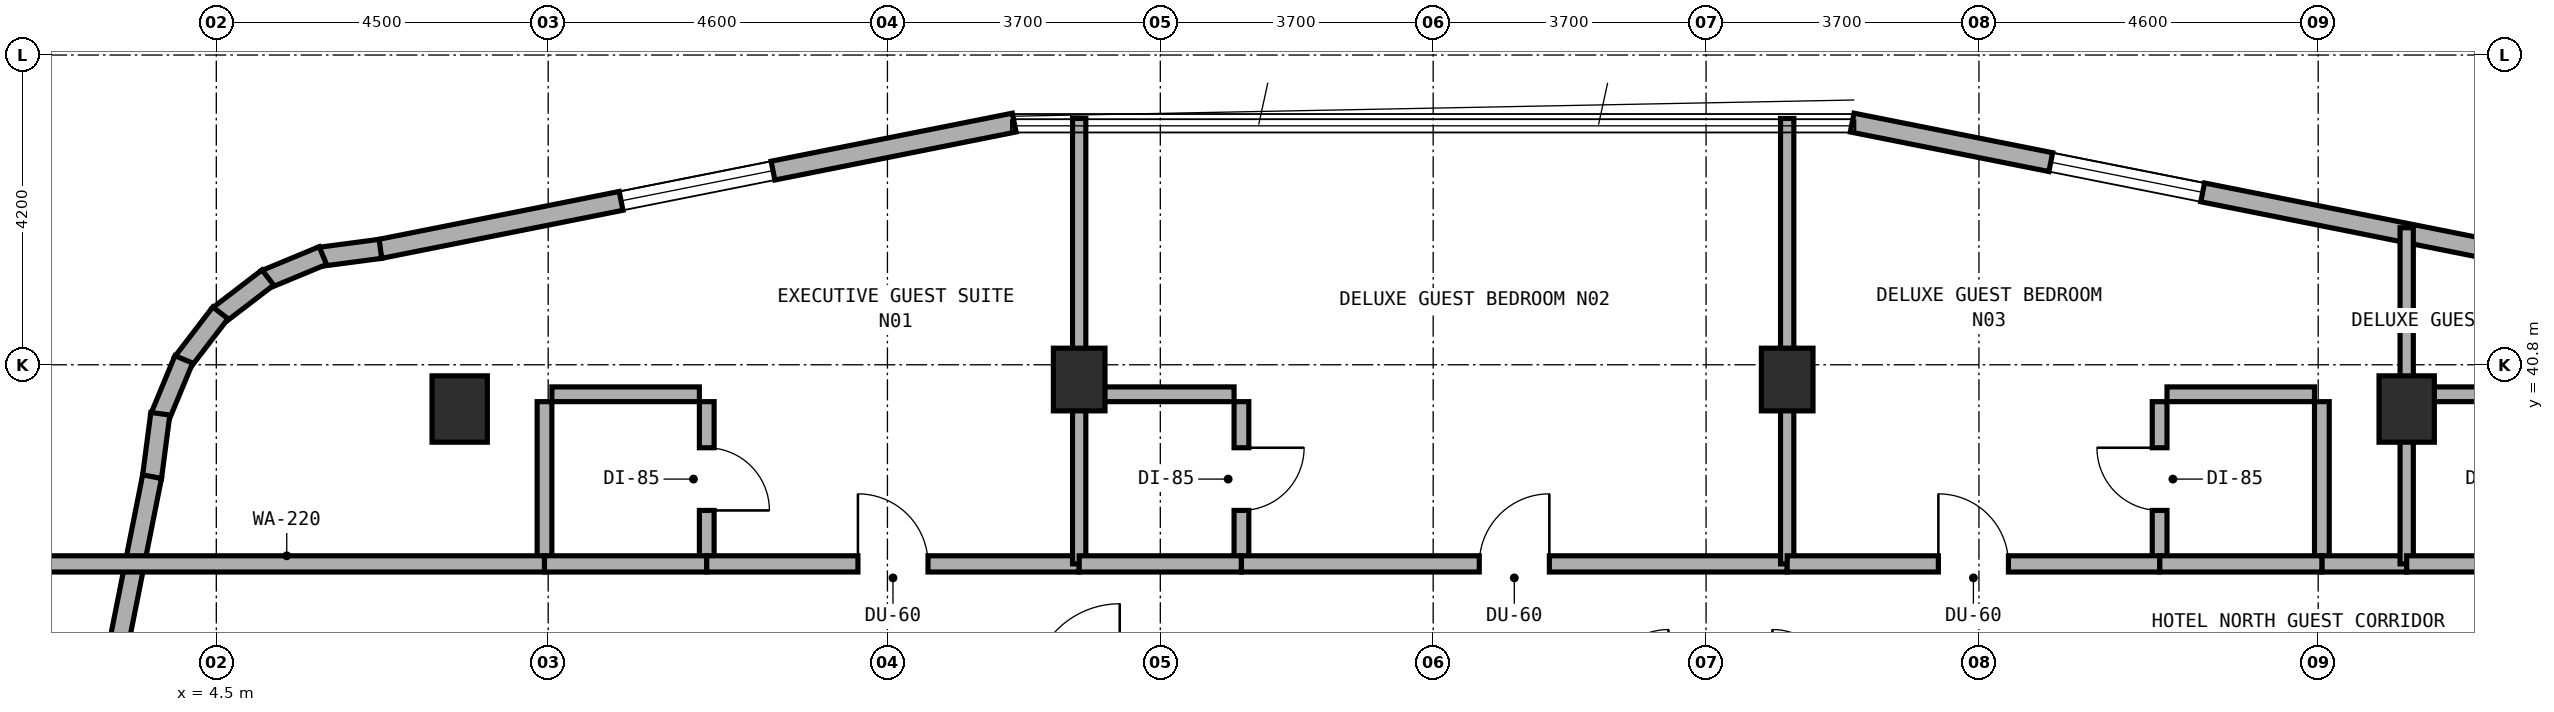
"""IFC4 building model, lengths in metres.
Left out: names, types, materials, properties, quantities, classifications, styles, units other than length and angle.
Written with IfcOpenShell. Run it as: python <this file> out.ifc"""

import sys

from ifc_helpers import new_model, si_unit, direction, frame, frame_2d, origin, origin_2d, place, context, subcontext, project, spatial, rectangle, extrude, element, fill, save


model = new_model("IFC4")
c1 = context("Model", 3, precision=1e-05, world=origin(), true_north=direction((0.0, 1.0)))
c2 = subcontext(c1, "Body", "Model", "MODEL_VIEW")
j1 = project(units=[si_unit("LENGTHUNIT", "METRE"), si_unit("PLANEANGLEUNIT", "RADIAN")], contexts=[c1])
p1 = place(None, origin())
s1 = spatial("IfcSite", under=j1, at=p1, CompositionType="ELEMENT")
p2 = place(p1, origin())
s2 = spatial("IfcBuilding", under=s1, at=p2, CompositionType="ELEMENT")
p3 = place(p2, frame((0.0, 0.0, 224.3)))
s3 = spatial("IfcBuildingStorey", under=s2, at=p3, CompositionType="ELEMENT", Elevation=224.3)
for number, where, z_axis, x_axis in (
    (1, (16.2, 40.6, 0.0), (0.0, 0.0, 1.0), (1.0, 0.0, 0.0)),
    (2, (25.8, 40.6, 0.0), (0.0, 0.0, 1.0), (1.0, 0.0, 0.0)),
):
    element("IfcColumn", number, at=place(p3, frame(where, z_axis=z_axis, x_axis=x_axis)), inside=s3, PredefinedType="COLUMN", context=c2, shape_type="SweptSolid", body=[
        extrude(rectangle(XDim=0.7, YDim=0.85, at=origin_2d()), origin(), (0.0, 0.0, 1.0), 3.6),
    ])
for number, where, z_axis, x_axis in (
    (3, (34.2, 40.2, 0.0), (0.0, 0.0, 1.0), (1.0, 0.0, 0.0)),
    (4, (7.8, 40.2, 0.0), (0.0, 0.0, 1.0), (1.0, 0.0, 0.0)),
):
    element("IfcColumn", number, at=place(p3, frame(where, z_axis=z_axis, x_axis=x_axis)), inside=s3, PredefinedType="COLUMN", context=c2, shape_type="SweptSolid", body=[
        extrude(rectangle(XDim=0.75, YDim=0.9, at=origin_2d()), origin(), (0.0, 0.0, 1.0), 3.6),
    ])
p4 = place(p3, frame((35.283, 42.371, 0.0), z_axis=(0.0, 0.0, 1.0), x_axis=(-0.980745199176, 0.195291715883, 0.0)))
e5 = element("IfcWall", 5, at=p4, inside=s3, PredefinedType="STANDARD", context=c2, shape_type="SweptSolid", body=[
    extrude(rectangle(XDim=8.771, YDim=0.26, at=frame_2d((4.385, 0.0))), origin(), (0.0, 0.0, 1.0), 3.32),
])
p5 = place(p4, frame((3.925, 0.0, 0.85)))
e6 = element("IfcOpeningElement", 6, at=p5, cuts=e5, PredefinedType="OPENING", context=c2, shape_type="SweptSolid", body=[
    extrude(rectangle(XDim=2.1, YDim=1.5, at=frame_2d((1.05, 0.75))), frame((0.0, 0.14, 0.0), z_axis=(0.0, -1.0, 0.0), x_axis=(1.0, 0.0, 0.0)), (0.0, 0.0, 1.0), 0.28),
])
p6 = place(p3, frame((15.319, 44.084, 0.0), z_axis=(0.0, 0.0, 1.0), x_axis=(-0.980745199176, -0.195291715883, 0.0)))
e7 = element("IfcWall", 7, at=p6, inside=s3, PredefinedType="STANDARD", context=c2, shape_type="SweptSolid", body=[
    extrude(rectangle(XDim=8.771, YDim=0.26, at=frame_2d((4.385, 0.0))), origin(), (0.0, 0.0, 1.0), 3.32),
])
p7 = place(p6, frame((3.335, 0.0, 0.85)))
e8 = element("IfcOpeningElement", 8, at=p7, cuts=e7, PredefinedType="OPENING", context=c2, shape_type="SweptSolid", body=[
    extrude(rectangle(XDim=2.1, YDim=1.5, at=frame_2d((1.05, 0.75))), frame((0.0, 0.14, 0.0), z_axis=(0.0, -1.0, 0.0), x_axis=(1.0, 0.0, 0.0)), (0.0, 0.0, 1.0), 0.28),
])
p8 = place(p3, frame((6.725, 42.372, 0.0), z_axis=(0.0, 0.0, 1.0), x_axis=(-0.9913883573, -0.130954667764, 0.0)))
e9 = element("IfcWall", 9, at=p8, inside=s3, PredefinedType="STANDARD", context=c2, shape_type="SweptSolid", body=[
    extrude(rectangle(XDim=0.833, YDim=0.26, at=frame_2d((0.417, 0.0))), origin(), (0.0, 0.0, 1.0), 3.32),
])
p9 = place(p3, frame((5.945, 42.281, 0.0), z_axis=(0.0, 0.0, 1.0), x_axis=(-0.923754491172, -0.382985169477, 0.0)))
e10 = element("IfcWall", 10, at=p9, inside=s3, PredefinedType="STANDARD", context=c2, shape_type="SweptSolid", body=[
    extrude(rectangle(XDim=0.851, YDim=0.26, at=frame_2d((0.426, 0.0))), origin(), (0.0, 0.0, 1.0), 3.32),
])
for number, where, z_axis, x_axis in (
    (11, (5.199, 41.983, 0.0), (0.0, 0.0, 1.0), (-0.794, -0.608, 0.0)),
    (12, (4.555, 41.504, 0.0), (0.0, 0.0, 1.0), (-0.608, -0.794, 0.0)),
):
    element("IfcWall", number, at=place(p3, frame(where, z_axis=z_axis, x_axis=x_axis)), inside=s3, PredefinedType="STANDARD", context=c2, shape_type="SweptSolid", body=[
        extrude(rectangle(XDim=0.85, YDim=0.26, at=frame_2d((0.425, 0.0))), origin(), (0.0, 0.0, 1.0), 3.32),
    ])
p10 = place(p3, frame((4.059, 40.873, 0.0), z_axis=(0.0, 0.0, 1.0), x_axis=(-0.383229930484, -0.923652976167, 0.0)))
e13 = element("IfcWall", 13, at=p10, inside=s3, PredefinedType="STANDARD", context=c2, shape_type="SweptSolid", body=[
    extrude(rectangle(XDim=0.851, YDim=0.26, at=frame_2d((0.426, 0.0))), origin(), (0.0, 0.0, 1.0), 3.32),
])
p11 = place(p3, frame((3.741, 40.136, 0.0), z_axis=(0.0, 0.0, 1.0), x_axis=(-0.130156359936, -0.991493480548, 0.0)))
e14 = element("IfcWall", 14, at=p11, inside=s3, PredefinedType="STANDARD", context=c2, shape_type="SweptSolid", body=[
    extrude(rectangle(XDim=0.868, YDim=0.26, at=frame_2d((0.434, 0.0))), origin(), (0.0, 0.0, 1.0), 3.32),
])
p12 = place(p3, frame((3.629, 39.283, 0.0), z_axis=(0.0, 0.0, 1.0), x_axis=(-0.195291715883, -0.980745199176, 0.0)))
e15 = element("IfcWall", 15, at=p12, inside=s3, PredefinedType="STANDARD", context=c2, shape_type="SweptSolid", body=[
    extrude(rectangle(XDim=8.771, YDim=0.26, at=frame_2d((4.385, 0.0))), origin(), (0.0, 0.0, 1.0), 3.32),
])
p13 = place(p12, frame((4.0, 0.0, 0.85)))
e16 = element("IfcOpeningElement", 16, at=p13, cuts=e15, PredefinedType="OPENING", context=c2, shape_type="SweptSolid", body=[
    extrude(rectangle(XDim=2.1, YDim=1.5, at=frame_2d((1.05, 0.75))), frame((0.0, 0.14, 0.0), z_axis=(0.0, -1.0, 0.0), x_axis=(1.0, 0.0, 0.0)), (0.0, 0.0, 1.0), 0.28),
])
p14 = place(p3, frame((11.15, 38.2, 0.0), z_axis=(0.0, 0.0, 1.0), x_axis=(0.0, 1.0, 0.0)))
e17 = element("IfcWall", 17, at=p14, inside=s3, PredefinedType="PLUMBINGWALL", context=c2, shape_type="SweptSolid", body=[
    extrude(rectangle(XDim=2.1, YDim=0.2, at=frame_2d((1.05, 0.0))), origin(), (0.0, 0.0, 1.0), 3.015),
])
p15 = place(p14, frame((0.625, 0.0, 0.0)))
e18 = element("IfcOpeningElement", 18, at=p15, cuts=e17, PredefinedType="OPENING", context=c2, shape_type="SweptSolid", body=[
    extrude(rectangle(XDim=0.85, YDim=2.1, at=frame_2d((0.425, 1.05))), frame((0.0, 0.11, 0.0), z_axis=(0.0, -1.0, 0.0), x_axis=(1.0, 0.0, 0.0)), (0.0, 0.0, 1.0), 0.22),
])
p16 = place(p3, frame((9.05, 40.4, 0.0), z_axis=(0.0, 0.0, 1.0), x_axis=(1.0, 0.0, 0.0)))
e19 = element("IfcWall", 19, at=p16, inside=s3, PredefinedType="PLUMBINGWALL", context=c2, shape_type="SweptSolid", body=[
    extrude(rectangle(XDim=2.0, YDim=0.2, at=frame_2d((1.0, 0.0))), origin(), (0.0, 0.0, 1.0), 3.015),
])
p17 = place(p3, frame((8.95, 38.2, 0.0), z_axis=(0.0, 0.0, 1.0), x_axis=(0.0, 1.0, 0.0)))
e20 = element("IfcWall", 20, at=p17, inside=s3, PredefinedType="PLUMBINGWALL", context=c2, shape_type="SweptSolid", body=[
    extrude(rectangle(XDim=2.1, YDim=0.2, at=frame_2d((1.05, 0.0))), origin(), (0.0, 0.0, 1.0), 3.015),
])
p18 = place(p3, frame((1.96, 38.1, 0.0), z_axis=(0.0, 0.0, 1.0), x_axis=(1.0, 0.0, 0.0)))
e21 = element("IfcWall", 21, at=p18, inside=s3, PredefinedType="SOLIDWALL", context=c2, shape_type="SweptSolid", body=[
    extrude(rectangle(XDim=6.99, YDim=0.22, at=frame_2d((3.495, 0.0))), origin(), (0.0, 0.0, 1.0), 2.695),
])
p19 = place(p3, frame((8.95, 38.1, 0.0), z_axis=(0.0, 0.0, 1.0), x_axis=(1.0, 0.0, 0.0)))
e22 = element("IfcWall", 22, at=p19, inside=s3, PredefinedType="SOLIDWALL", context=c2, shape_type="SweptSolid", body=[
    extrude(rectangle(XDim=2.2, YDim=0.22, at=frame_2d((1.1, 0.0))), origin(), (0.0, 0.0, 1.0), 3.32),
])
p20 = place(p3, frame((11.15, 38.1, 0.0), z_axis=(0.0, 0.0, 1.0), x_axis=(1.0, 0.0, 0.0)))
e23 = element("IfcWall", 23, at=p20, inside=s3, PredefinedType="SOLIDWALL", context=c2, shape_type="SweptSolid", body=[
    extrude(rectangle(XDim=5.05, YDim=0.22, at=frame_2d((2.525, 0.0))), origin(), (0.0, 0.0, 1.0), 2.695),
])
p21 = place(p20, frame((2.05, 0.0, 0.0)))
e24 = element("IfcOpeningElement", 24, at=p21, cuts=e23, PredefinedType="OPENING", context=c2, shape_type="SweptSolid", body=[
    extrude(rectangle(XDim=0.95, YDim=2.1, at=frame_2d((0.475, 1.05))), frame((0.0, 0.12, 0.0), z_axis=(0.0, -1.0, 0.0), x_axis=(1.0, 0.0, 0.0)), (0.0, 0.0, 1.0), 0.24),
])
p22 = place(p3, frame((16.2, 38.1, 0.0), z_axis=(0.0, 0.0, 1.0), x_axis=(0.0, 1.0, 0.0)))
e25 = element("IfcWall", 25, at=p22, inside=s3, PredefinedType="SOLIDWALL", context=c2, shape_type="SweptSolid", body=[
    extrude(rectangle(XDim=6.04, YDim=0.18, at=frame_2d((3.02, 0.0))), origin(), (0.0, 0.0, 1.0), 2.695),
])
p23 = place(p3, frame((18.4, 38.2, 0.0), z_axis=(0.0, 0.0, 1.0), x_axis=(0.0, 1.0, 0.0)))
e26 = element("IfcWall", 26, at=p23, inside=s3, PredefinedType="PLUMBINGWALL", context=c2, shape_type="SweptSolid", body=[
    extrude(rectangle(XDim=2.1, YDim=0.2, at=frame_2d((1.05, 0.0))), origin(), (0.0, 0.0, 1.0), 3.055),
])
p24 = place(p23, frame((0.625, 0.0, 0.0)))
e27 = element("IfcOpeningElement", 27, at=p24, cuts=e26, PredefinedType="OPENING", context=c2, shape_type="SweptSolid", body=[
    extrude(rectangle(XDim=0.85, YDim=2.1, at=frame_2d((0.425, 1.05))), frame((0.0, 0.11, 0.0), z_axis=(0.0, -1.0, 0.0), x_axis=(1.0, 0.0, 0.0)), (0.0, 0.0, 1.0), 0.22),
])
p25 = place(p3, frame((16.3, 40.4, 0.0), z_axis=(0.0, 0.0, 1.0), x_axis=(1.0, 0.0, 0.0)))
e28 = element("IfcWall", 28, at=p25, inside=s3, PredefinedType="PLUMBINGWALL", context=c2, shape_type="SweptSolid", body=[
    extrude(rectangle(XDim=2.0, YDim=0.2, at=frame_2d((1.0, 0.0))), origin(), (0.0, 0.0, 1.0), 3.015),
])
p26 = place(p3, frame((16.2, 38.1, 0.0), z_axis=(0.0, 0.0, 1.0), x_axis=(1.0, 0.0, 0.0)))
e29 = element("IfcWall", 29, at=p26, inside=s3, PredefinedType="SOLIDWALL", context=c2, shape_type="SweptSolid", body=[
    extrude(rectangle(XDim=2.2, YDim=0.22, at=frame_2d((1.1, 0.0))), origin(), (0.0, 0.0, 1.0), 2.695),
])
p27 = place(p3, frame((18.4, 38.1, 0.0), z_axis=(0.0, 0.0, 1.0), x_axis=(1.0, 0.0, 0.0)))
e30 = element("IfcWall", 30, at=p27, inside=s3, PredefinedType="SOLIDWALL", context=c2, shape_type="SweptSolid", body=[
    extrude(rectangle(XDim=7.4, YDim=0.22, at=frame_2d((3.7, 0.0))), origin(), (0.0, 0.0, 1.0), 2.695),
])
p28 = place(p27, frame((3.225, 0.0, 0.0)))
e31 = element("IfcOpeningElement", 31, at=p28, cuts=e30, PredefinedType="OPENING", context=c2, shape_type="SweptSolid", body=[
    extrude(rectangle(XDim=0.95, YDim=2.1, at=frame_2d((0.475, 1.05))), frame((0.0, 0.12, 0.0), z_axis=(0.0, -1.0, 0.0), x_axis=(1.0, 0.0, 0.0)), (0.0, 0.0, 1.0), 0.24),
])
p29 = place(p3, frame((25.8, 38.1, 0.0), z_axis=(0.0, 0.0, 1.0), x_axis=(0.0, 1.0, 0.0)))
e32 = element("IfcWall", 32, at=p29, inside=s3, PredefinedType="SOLIDWALL", context=c2, shape_type="SweptSolid", body=[
    extrude(rectangle(XDim=6.04, YDim=0.18, at=frame_2d((3.02, 0.0))), origin(), (0.0, 0.0, 1.0), 2.695),
])
p30 = place(p3, frame((30.85, 38.2, 0.0), z_axis=(0.0, 0.0, 1.0), x_axis=(0.0, 1.0, 0.0)))
e33 = element("IfcWall", 33, at=p30, inside=s3, PredefinedType="PLUMBINGWALL", context=c2, shape_type="SweptSolid", body=[
    extrude(rectangle(XDim=2.1, YDim=0.2, at=frame_2d((1.05, 0.0))), origin(), (0.0, 0.0, 1.0), 3.015),
])
p31 = place(p30, frame((0.625, 0.0, 0.0)))
e34 = element("IfcOpeningElement", 34, at=p31, cuts=e33, PredefinedType="OPENING", context=c2, shape_type="SweptSolid", body=[
    extrude(rectangle(XDim=0.85, YDim=2.1, at=frame_2d((0.425, 1.05))), frame((0.0, 0.11, 0.0), z_axis=(0.0, -1.0, 0.0), x_axis=(1.0, 0.0, 0.0)), (0.0, 0.0, 1.0), 0.22),
])
p32 = place(p3, frame((30.95, 40.4, 0.0), z_axis=(0.0, 0.0, 1.0), x_axis=(1.0, 0.0, 0.0)))
e35 = element("IfcWall", 35, at=p32, inside=s3, PredefinedType="PLUMBINGWALL", context=c2, shape_type="SweptSolid", body=[
    extrude(rectangle(XDim=2.0, YDim=0.2, at=frame_2d((1.0, 0.0))), origin(), (0.0, 0.0, 1.0), 3.015),
])
p33 = place(p3, frame((33.05, 38.2, 0.0), z_axis=(0.0, 0.0, 1.0), x_axis=(0.0, 1.0, 0.0)))
e36 = element("IfcWall", 36, at=p33, inside=s3, PredefinedType="PLUMBINGWALL", context=c2, shape_type="SweptSolid", body=[
    extrude(rectangle(XDim=2.1, YDim=0.2, at=frame_2d((1.05, 0.0))), origin(), (0.0, 0.0, 1.0), 3.015),
])
p34 = place(p3, frame((33.05, 38.1, 0.0), z_axis=(0.0, 0.0, 1.0), x_axis=(1.0, 0.0, 0.0)))
e37 = element("IfcWall", 37, at=p34, inside=s3, PredefinedType="SOLIDWALL", context=c2, shape_type="SweptSolid", body=[
    extrude(rectangle(XDim=1.15, YDim=0.22, at=frame_2d((0.575, 0.0))), origin(), (0.0, 0.0, 1.0), 2.695),
])
p35 = place(p3, frame((30.85, 38.1, 0.0), z_axis=(0.0, 0.0, 1.0), x_axis=(1.0, 0.0, 0.0)))
e38 = element("IfcWall", 38, at=p35, inside=s3, PredefinedType="SOLIDWALL", context=c2, shape_type="SweptSolid", body=[
    extrude(rectangle(XDim=2.2, YDim=0.22, at=frame_2d((1.1, 0.0))), origin(), (0.0, 0.0, 1.0), 3.32),
])
p36 = place(p3, frame((25.8, 38.1, 0.0), z_axis=(0.0, 0.0, 1.0), x_axis=(1.0, 0.0, 0.0)))
e39 = element("IfcWall", 39, at=p36, inside=s3, PredefinedType="SOLIDWALL", context=c2, shape_type="SweptSolid", body=[
    extrude(rectangle(XDim=5.05, YDim=0.22, at=frame_2d((2.525, 0.0))), origin(), (0.0, 0.0, 1.0), 2.695),
])
p37 = place(p36, frame((2.05, 0.0, 0.0)))
e40 = element("IfcOpeningElement", 40, at=p37, cuts=e39, PredefinedType="OPENING", context=c2, shape_type="SweptSolid", body=[
    extrude(rectangle(XDim=0.95, YDim=2.1, at=frame_2d((0.475, 1.05))), frame((0.0, 0.12, 0.0), z_axis=(0.0, -1.0, 0.0), x_axis=(1.0, 0.0, 0.0)), (0.0, 0.0, 1.0), 0.24),
])
p38 = place(p3, frame((34.2, 38.1, 0.0), z_axis=(0.0, 0.0, 1.0), x_axis=(0.0, 1.0, 0.0)))
e41 = element("IfcWall", 41, at=p38, inside=s3, PredefinedType="SOLIDWALL", context=c2, shape_type="SweptSolid", body=[
    extrude(rectangle(XDim=4.558, YDim=0.18, at=frame_2d((2.279, 0.0))), origin(), (0.0, 0.0, 1.0), 2.695),
])
p39 = place(p3, frame((34.3, 40.4, 0.0), z_axis=(0.0, 0.0, 1.0), x_axis=(1.0, 0.0, 0.0)))
e42 = element("IfcWall", 42, at=p39, inside=s3, PredefinedType="PLUMBINGWALL", context=c2, shape_type="SweptSolid", body=[
    extrude(rectangle(XDim=2.0, YDim=0.2, at=frame_2d((1.0, 0.0))), origin(), (0.0, 0.0, 1.0), 3.32),
])
p40 = place(p3, frame((34.2, 38.1, 0.0), z_axis=(0.0, 0.0, 1.0), x_axis=(1.0, 0.0, 0.0)))
e43 = element("IfcWall", 43, at=p40, inside=s3, PredefinedType="SOLIDWALL", context=c2, shape_type="SweptSolid", body=[
    extrude(rectangle(XDim=2.2, YDim=0.22, at=frame_2d((1.1, 0.0))), origin(), (0.0, 0.0, 1.0), 2.695),
])
p41 = place(p5, origin())
e44 = element("IfcWindow", 44, at=p41, inside=s3, PartitioningType="SINGLE_PANEL", PredefinedType="WINDOW", context=c2, shape_type="SweptSolid", body=[
    extrude(rectangle(XDim=2.1, YDim=1.5, at=frame_2d((1.05, 0.75))), frame((0.0, 0.03, 0.0), z_axis=(0.0, -1.0, 0.0), x_axis=(1.0, 0.0, 0.0)), (0.0, 0.0, 1.0), 0.06),
])
fill(e6, e44)
p42 = place(p7, origin())
e45 = element("IfcWindow", 45, at=p42, inside=s3, PartitioningType="SINGLE_PANEL", PredefinedType="WINDOW", context=c2, shape_type="SweptSolid", body=[
    extrude(rectangle(XDim=2.1, YDim=1.5, at=frame_2d((1.05, 0.75))), frame((0.0, 0.03, 0.0), z_axis=(0.0, -1.0, 0.0), x_axis=(1.0, 0.0, 0.0)), (0.0, 0.0, 1.0), 0.06),
])
fill(e8, e45)
p43 = place(p15, frame((0.85, 0.0, 0.0), z_axis=(0.0, 0.0, 1.0), x_axis=(-1.0, 0.0, 0.0)))
e46 = element("IfcDoor", 46, at=p43, inside=s3, OperationType="SINGLE_SWING_RIGHT", PredefinedType="DOOR", context=c2, shape_type="SweptSolid", body=[
    extrude(rectangle(XDim=0.85, YDim=2.1, at=frame_2d((0.425, 1.05))), frame((0.0, 0.025, 0.0), z_axis=(0.0, -1.0, 0.0), x_axis=(1.0, 0.0, 0.0)), (0.0, 0.0, 1.0), 0.05),
])
fill(e18, e46)
p44 = place(p21, origin())
e47 = element("IfcDoor", 47, at=p44, inside=s3, OperationType="SINGLE_SWING_LEFT", PredefinedType="DOOR", context=c2, shape_type="SweptSolid", body=[
    extrude(rectangle(XDim=0.95, YDim=2.1, at=frame_2d((0.475, 1.05))), frame((0.0, 0.025, 0.0), z_axis=(0.0, -1.0, 0.0), x_axis=(1.0, 0.0, 0.0)), (0.0, 0.0, 1.0), 0.05),
])
fill(e24, e47)
p45 = place(p24, frame((0.85, 0.0, 0.0), z_axis=(0.0, 0.0, 1.0), x_axis=(-1.0, 0.0, 0.0)))
e48 = element("IfcDoor", 48, at=p45, inside=s3, OperationType="SINGLE_SWING_LEFT", PredefinedType="DOOR", context=c2, shape_type="SweptSolid", body=[
    extrude(rectangle(XDim=0.85, YDim=2.1, at=frame_2d((0.425, 1.05))), frame((0.0, 0.025, 0.0), z_axis=(0.0, -1.0, 0.0), x_axis=(1.0, 0.0, 0.0)), (0.0, 0.0, 1.0), 0.05),
])
fill(e27, e48)
p46 = place(p28, origin())
e49 = element("IfcDoor", 49, at=p46, inside=s3, OperationType="SINGLE_SWING_RIGHT", PredefinedType="DOOR", context=c2, shape_type="SweptSolid", body=[
    extrude(rectangle(XDim=0.95, YDim=2.1, at=frame_2d((0.475, 1.05))), frame((0.0, 0.025, 0.0), z_axis=(0.0, -1.0, 0.0), x_axis=(1.0, 0.0, 0.0)), (0.0, 0.0, 1.0), 0.05),
])
fill(e31, e49)
p47 = place(p31, origin())
e50 = element("IfcDoor", 50, at=p47, inside=s3, OperationType="SINGLE_SWING_RIGHT", PredefinedType="DOOR", context=c2, shape_type="SweptSolid", body=[
    extrude(rectangle(XDim=0.85, YDim=2.1, at=frame_2d((0.425, 1.05))), frame((0.0, 0.025, 0.0), z_axis=(0.0, -1.0, 0.0), x_axis=(1.0, 0.0, 0.0)), (0.0, 0.0, 1.0), 0.05),
])
fill(e34, e50)
p48 = place(p37, origin())
e51 = element("IfcDoor", 51, at=p48, inside=s3, OperationType="SINGLE_SWING_LEFT", PredefinedType="DOOR", context=c2, shape_type="SweptSolid", body=[
    extrude(rectangle(XDim=0.95, YDim=2.1, at=frame_2d((0.475, 1.05))), frame((0.0, 0.025, 0.0), z_axis=(0.0, -1.0, 0.0), x_axis=(1.0, 0.0, 0.0)), (0.0, 0.0, 1.0), 0.05),
])
fill(e40, e51)
save(model, sys.argv[1])
